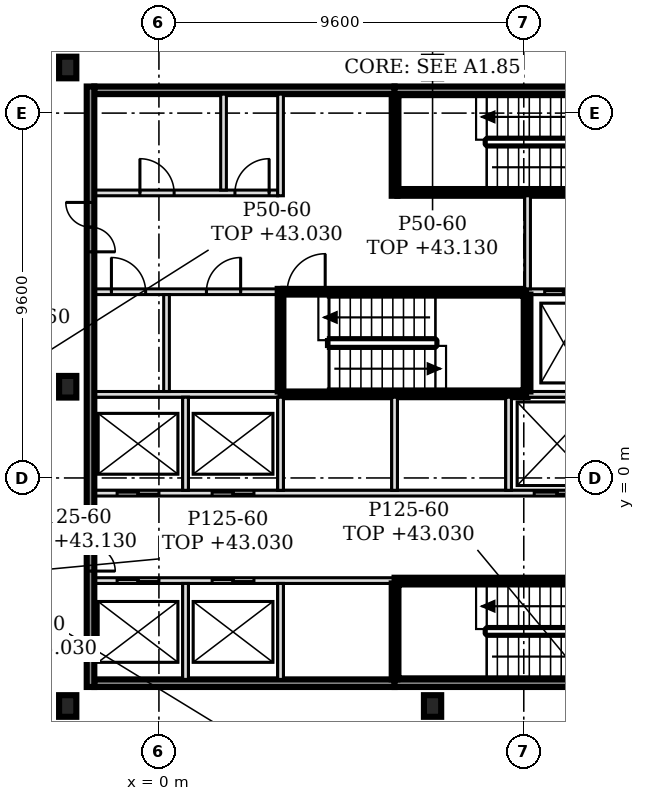
"""IFC4 building model, lengths in metres.
Left out: names, types, materials, properties, quantities, classifications, styles, units other than length and angle.
Written with IfcOpenShell. Run it as: python <this file> out.ifc"""

import sys

from ifc_helpers import new_model, si_unit, direction, frame, frame_2d, origin, origin_2d, place, context, subcontext, project, spatial, rectangle, i_section, extrude, element, fill, save


model = new_model("IFC4")
c1 = context("Model", 3, precision=1e-05, world=origin(), true_north=direction((0.0, 1.0)))
c2 = subcontext(c1, "Body", "Model", "MODEL_VIEW")
j1 = project(units=[si_unit("LENGTHUNIT", "METRE"), si_unit("PLANEANGLEUNIT", "RADIAN")], contexts=[c1])
p1 = place(None, origin())
s1 = spatial("IfcSite", under=j1, at=p1, CompositionType="ELEMENT")
p2 = place(p1, origin())
s2 = spatial("IfcBuilding", under=s1, at=p2, CompositionType="ELEMENT")
p3 = place(p2, frame((0.0, 0.0, 40.2)))
s3 = spatial("IfcBuildingStorey", under=s2, at=p3, CompositionType="ELEMENT", Elevation=40.2)
for number, where, z_axis, x_axis in (
    (1, (-2.4, -6.0, -0.15), (0.0, 0.0, 1.0), (1.0, 0.0, 0.0)),
    (2, (7.2, -6.0, -0.15), (0.0, 0.0, 1.0), (1.0, 0.0, 0.0)),
    (3, (-2.4, 2.4, -0.15), (0.0, 0.0, 1.0), (1.0, 0.0, 0.0)),
    (4, (-2.4, 10.8, -0.15), (0.0, 0.0, 1.0), (1.0, 0.0, 0.0)),
    (5, (7.2, 10.8, -0.15), (0.0, 0.0, 1.0), (1.0, 0.0, 0.0)),
):
    element("IfcColumn", number, at=place(p3, frame(where, z_axis=z_axis, x_axis=x_axis)), inside=s3, PredefinedType="COLUMN", context=c2, shape_type="SweptSolid", body=[
        extrude(i_section(OverallWidth=0.454, OverallDepth=0.569, WebThickness=0.078, FlangeThickness=0.125, FilletRadius=0.015, at=origin_2d()), origin(), (0.0, 0.0, 1.0), 3.6),
    ])
p4 = place(p3, frame((-1.7, -5.4, 0.0), z_axis=(0.0, 0.0, 1.0), x_axis=(1.0, 0.0, 0.0)))
e6 = element("IfcWall", 6, at=p4, inside=s3, PredefinedType="SOLIDWALL", context=c2, shape_type="SweptSolid", body=[
    extrude(rectangle(XDim=7.9, YDim=0.2, at=frame_2d((3.95, 0.0))), origin(), (0.0, 0.0, 1.0), 3.45),
])
p5 = place(p3, frame((6.2, -5.4, 0.0), z_axis=(0.0, 0.0, 1.0), x_axis=(1.0, 0.0, 0.0)))
e7 = element("IfcWall", 7, at=p5, inside=s3, PredefinedType="SOLIDWALL", context=c2, shape_type="SweptSolid", body=[
    extrude(rectangle(XDim=6.5, YDim=0.2, at=frame_2d((3.25, 0.0))), origin(), (0.0, 0.0, 1.0), 3.45),
])
p6 = place(p3, frame((-1.7, -2.7, 0.0), z_axis=(0.0, 0.0, 1.0), x_axis=(1.0, 0.0, 0.0)))
e8 = element("IfcWall", 8, at=p6, inside=s3, PredefinedType="SOLIDWALL", context=c2, shape_type="SweptSolid", body=[
    extrude(rectangle(XDim=7.9, YDim=0.15, at=frame_2d((3.95, 0.0))), origin(), (0.0, 0.0, 1.0), 3.45),
])
p7 = place(p6, frame((0.6, 0.0, 0.0)))
e9 = element("IfcOpeningElement", 9, at=p7, cuts=e8, PredefinedType="OPENING", context=c2, shape_type="SweptSolid", body=[
    extrude(rectangle(XDim=1.1, YDim=2.1, at=frame_2d((0.55, 1.05))), frame((0.0, 0.085, 0.0), z_axis=(0.0, -1.0, 0.0), x_axis=(1.0, 0.0, 0.0)), (0.0, 0.0, 1.0), 0.17),
])
p8 = place(p6, frame((3.1, 0.0, 0.0)))
e10 = element("IfcOpeningElement", 10, at=p8, cuts=e8, PredefinedType="OPENING", context=c2, shape_type="SweptSolid", body=[
    extrude(rectangle(XDim=1.1, YDim=2.1, at=frame_2d((0.55, 1.05))), frame((0.0, 0.085, 0.0), z_axis=(0.0, -1.0, 0.0), x_axis=(1.0, 0.0, 0.0)), (0.0, 0.0, 1.0), 0.17),
])
p9 = place(p3, frame((6.2, -2.7, 0.0), z_axis=(0.0, 0.0, 1.0), x_axis=(1.0, 0.0, 0.0)))
e11 = element("IfcWall", 11, at=p9, inside=s3, PredefinedType="SOLIDWALL", context=c2, shape_type="SweptSolid", body=[
    extrude(rectangle(XDim=6.425, YDim=0.15, at=frame_2d((3.212, 0.0))), origin(), (0.0, 0.0, 1.0), 3.45),
])
p10 = place(p9, frame((5.3, 0.0, 0.0)))
e12 = element("IfcOpeningElement", 12, at=p10, cuts=e11, PredefinedType="OPENING", context=c2, shape_type="SweptSolid", body=[
    extrude(rectangle(XDim=1.0, YDim=2.1, at=frame_2d((0.5, 1.05))), frame((0.0, 0.085, 0.0), z_axis=(0.0, -1.0, 0.0), x_axis=(1.0, 0.0, 0.0)), (0.0, 0.0, 1.0), 0.17),
])
p11 = place(p3, frame((-1.7, -0.4, 0.0), z_axis=(0.0, 0.0, 1.0), x_axis=(1.0, 0.0, 0.0)))
e13 = element("IfcWall", 13, at=p11, inside=s3, PredefinedType="SOLIDWALL", context=c2, shape_type="SweptSolid", body=[
    extrude(rectangle(XDim=15.925, YDim=0.15, at=frame_2d((7.962, 0.0))), origin(), (0.0, 0.0, 1.0), 3.45),
])
p12 = place(p11, frame((0.6, 0.0, 0.0)))
e14 = element("IfcOpeningElement", 14, at=p12, cuts=e13, PredefinedType="OPENING", context=c2, shape_type="SweptSolid", body=[
    extrude(rectangle(XDim=1.1, YDim=2.1, at=frame_2d((0.55, 1.05))), frame((0.0, 0.085, 0.0), z_axis=(0.0, -1.0, 0.0), x_axis=(1.0, 0.0, 0.0)), (0.0, 0.0, 1.0), 0.17),
])
p13 = place(p11, frame((3.1, 0.0, 0.0)))
e15 = element("IfcOpeningElement", 15, at=p13, cuts=e13, PredefinedType="OPENING", context=c2, shape_type="SweptSolid", body=[
    extrude(rectangle(XDim=1.1, YDim=2.1, at=frame_2d((0.55, 1.05))), frame((0.0, 0.085, 0.0), z_axis=(0.0, -1.0, 0.0), x_axis=(1.0, 0.0, 0.0)), (0.0, 0.0, 1.0), 0.17),
])
p14 = place(p11, frame((11.575, 0.0, 0.0)))
e16 = element("IfcOpeningElement", 16, at=p14, cuts=e13, PredefinedType="OPENING", context=c2, shape_type="SweptSolid", body=[
    extrude(rectangle(XDim=1.2, YDim=2.1, at=frame_2d((0.6, 1.05))), frame((0.0, 0.085, 0.0), z_axis=(0.0, -1.0, 0.0), x_axis=(1.0, 0.0, 0.0)), (0.0, 0.0, 1.0), 0.17),
])
p15 = place(p11, frame((14.125, 0.0, 0.0)))
e17 = element("IfcOpeningElement", 17, at=p15, cuts=e13, PredefinedType="OPENING", context=c2, shape_type="SweptSolid", body=[
    extrude(rectangle(XDim=1.2, YDim=2.1, at=frame_2d((0.6, 1.05))), frame((0.0, 0.085, 0.0), z_axis=(0.0, -1.0, 0.0), x_axis=(1.0, 0.0, 0.0)), (0.0, 0.0, 1.0), 0.17),
])
p16 = place(p3, frame((-1.7, 2.2, 0.0), z_axis=(0.0, 0.0, 1.0), x_axis=(1.0, 0.0, 0.0)))
e18 = element("IfcWall", 18, at=p16, inside=s3, PredefinedType="SOLIDWALL", context=c2, shape_type="SweptSolid", body=[
    extrude(rectangle(XDim=4.9, YDim=0.15, at=frame_2d((2.45, 0.0))), origin(), (0.0, 0.0, 1.0), 3.45),
])
p17 = place(p3, frame((3.2, 2.2, 0.0), z_axis=(0.0, 0.0, 1.0), x_axis=(1.0, 0.0, 0.0)))
e19 = element("IfcWall", 19, at=p17, inside=s3, PredefinedType="SOLIDWALL", context=c2, shape_type="SweptSolid", body=[
    extrude(rectangle(XDim=6.5, YDim=0.15, at=frame_2d((3.25, 0.0))), origin(), (0.0, 0.0, 1.0), 3.45),
])
p18 = place(p3, frame((9.7, 2.2, 0.0), z_axis=(0.0, 0.0, 1.0), x_axis=(1.0, 0.0, 0.0)))
e20 = element("IfcWall", 20, at=p18, inside=s3, PredefinedType="SOLIDWALL", context=c2, shape_type="SweptSolid", body=[
    extrude(rectangle(XDim=4.525, YDim=0.15, at=frame_2d((2.263, 0.0))), origin(), (0.0, 0.0, 1.0), 3.45),
])
p19 = place(p3, frame((-1.7, 4.9, 0.0), z_axis=(0.0, 0.0, 1.0), x_axis=(1.0, 0.0, 0.0)))
e21 = element("IfcWall", 21, at=p19, inside=s3, PredefinedType="PARTITIONING", context=c2, shape_type="SweptSolid", body=[
    extrude(rectangle(XDim=4.825, YDim=0.15, at=frame_2d((2.413, 0.0))), origin(), (0.0, 0.0, 1.0), 3.45),
])
p20 = place(p19, frame((0.45, 0.0, 0.0)))
e22 = element("IfcOpeningElement", 22, at=p20, cuts=e21, PredefinedType="OPENING", context=c2, shape_type="SweptSolid", body=[
    extrude(rectangle(XDim=0.9, YDim=2.1, at=frame_2d((0.45, 1.05))), frame((0.0, 0.085, 0.0), z_axis=(0.0, -1.0, 0.0), x_axis=(1.0, 0.0, 0.0)), (0.0, 0.0, 1.0), 0.17),
])
p21 = place(p19, frame((2.95, 0.0, 0.0)))
e23 = element("IfcOpeningElement", 23, at=p21, cuts=e21, PredefinedType="OPENING", context=c2, shape_type="SweptSolid", body=[
    extrude(rectangle(XDim=0.9, YDim=2.1, at=frame_2d((0.45, 1.05))), frame((0.0, 0.085, 0.0), z_axis=(0.0, -1.0, 0.0), x_axis=(1.0, 0.0, 0.0)), (0.0, 0.0, 1.0), 0.17),
])
p22 = place(p3, frame((3.275, 4.9, 0.0), z_axis=(0.0, 0.0, 1.0), x_axis=(1.0, 0.0, 0.0)))
e24 = element("IfcWall", 24, at=p22, inside=s3, PredefinedType="SOLIDWALL", context=c2, shape_type="SweptSolid", body=[
    extrude(rectangle(XDim=6.425, YDim=0.15, at=frame_2d((3.212, 0.0))), origin(), (0.0, 0.0, 1.0), 3.45),
])
p23 = place(p22, frame((0.1, 0.0, 0.0)))
e25 = element("IfcOpeningElement", 25, at=p23, cuts=e24, PredefinedType="OPENING", context=c2, shape_type="SweptSolid", body=[
    extrude(rectangle(XDim=1.0, YDim=2.1, at=frame_2d((0.5, 1.05))), frame((0.0, 0.085, 0.0), z_axis=(0.0, -1.0, 0.0), x_axis=(1.0, 0.0, 0.0)), (0.0, 0.0, 1.0), 0.17),
])
p24 = place(p3, frame((9.7, 4.9, 0.0), z_axis=(0.0, 0.0, 1.0), x_axis=(1.0, 0.0, 0.0)))
e26 = element("IfcWall", 26, at=p24, inside=s3, PredefinedType="SOLIDWALL", context=c2, shape_type="SweptSolid", body=[
    extrude(rectangle(XDim=6.4, YDim=0.15, at=frame_2d((3.2, 0.0))), origin(), (0.0, 0.0, 1.0), 3.45),
])
p25 = place(p24, frame((0.45, 0.0, 0.0)))
e27 = element("IfcOpeningElement", 27, at=p25, cuts=e26, PredefinedType="OPENING", context=c2, shape_type="SweptSolid", body=[
    extrude(rectangle(XDim=1.0, YDim=2.1, at=frame_2d((0.5, 1.05))), frame((0.0, 0.085, 0.0), z_axis=(0.0, -1.0, 0.0), x_axis=(1.0, 0.0, 0.0)), (0.0, 0.0, 1.0), 0.17),
])
p26 = place(p24, frame((2.35, 0.0, 0.0)))
e28 = element("IfcOpeningElement", 28, at=p26, cuts=e26, PredefinedType="OPENING", context=c2, shape_type="SweptSolid", body=[
    extrude(rectangle(XDim=1.0, YDim=2.1, at=frame_2d((0.5, 1.05))), frame((0.0, 0.085, 0.0), z_axis=(0.0, -1.0, 0.0), x_axis=(1.0, 0.0, 0.0)), (0.0, 0.0, 1.0), 0.17),
])
p27 = place(p24, frame((4.7, 0.0, 0.0)))
e29 = element("IfcOpeningElement", 29, at=p27, cuts=e26, PredefinedType="OPENING", context=c2, shape_type="SweptSolid", body=[
    extrude(rectangle(XDim=0.9, YDim=2.1, at=frame_2d((0.45, 1.05))), frame((0.0, 0.085, 0.0), z_axis=(0.0, -1.0, 0.0), x_axis=(1.0, 0.0, 0.0)), (0.0, 0.0, 1.0), 0.17),
])
p28 = place(p3, frame((-1.7, 7.5, 0.0), z_axis=(0.0, 0.0, 1.0), x_axis=(1.0, 0.0, 0.0)))
e30 = element("IfcWall", 30, at=p28, inside=s3, PredefinedType="PARTITIONING", context=c2, shape_type="SweptSolid", body=[
    extrude(rectangle(XDim=4.825, YDim=0.15, at=frame_2d((2.413, 0.0))), origin(), (0.0, 0.0, 1.0), 3.45),
])
p29 = place(p28, frame((1.2, 0.0, 0.0)))
e31 = element("IfcOpeningElement", 31, at=p29, cuts=e30, PredefinedType="OPENING", context=c2, shape_type="SweptSolid", body=[
    extrude(rectangle(XDim=0.9, YDim=2.1, at=frame_2d((0.45, 1.05))), frame((0.0, 0.085, 0.0), z_axis=(0.0, -1.0, 0.0), x_axis=(1.0, 0.0, 0.0)), (0.0, 0.0, 1.0), 0.17),
])
p30 = place(p28, frame((3.7, 0.0, 0.0)))
e32 = element("IfcOpeningElement", 32, at=p30, cuts=e30, PredefinedType="OPENING", context=c2, shape_type="SweptSolid", body=[
    extrude(rectangle(XDim=0.9, YDim=2.1, at=frame_2d((0.45, 1.05))), frame((0.0, 0.085, 0.0), z_axis=(0.0, -1.0, 0.0), x_axis=(1.0, 0.0, 0.0)), (0.0, 0.0, 1.0), 0.17),
])
p31 = place(p3, frame((6.275, 7.5, 0.0), z_axis=(0.0, 0.0, 1.0), x_axis=(1.0, 0.0, 0.0)))
e33 = element("IfcWall", 33, at=p31, inside=s3, PredefinedType="SOLIDWALL", context=c2, shape_type="SweptSolid", body=[
    extrude(rectangle(XDim=6.425, YDim=0.15, at=frame_2d((3.212, 0.0))), origin(), (0.0, 0.0, 1.0), 3.45),
])
p32 = place(p31, frame((5.225, 0.0, 0.0)))
e34 = element("IfcOpeningElement", 34, at=p32, cuts=e33, PredefinedType="OPENING", context=c2, shape_type="SweptSolid", body=[
    extrude(rectangle(XDim=1.0, YDim=2.1, at=frame_2d((0.5, 1.05))), frame((0.0, 0.085, 0.0), z_axis=(0.0, -1.0, 0.0), x_axis=(1.0, 0.0, 0.0)), (0.0, 0.0, 1.0), 0.17),
])
p33 = place(p3, frame((-1.7, 10.2, 0.0), z_axis=(0.0, 0.0, 1.0), x_axis=(1.0, 0.0, 0.0)))
e35 = element("IfcWall", 35, at=p33, inside=s3, PredefinedType="SOLIDWALL", context=c2, shape_type="SweptSolid", body=[
    extrude(rectangle(XDim=7.9, YDim=0.2, at=frame_2d((3.95, 0.0))), origin(), (0.0, 0.0, 1.0), 3.45),
])
p34 = place(p3, frame((6.2, 10.2, 0.0), z_axis=(0.0, 0.0, 1.0), x_axis=(1.0, 0.0, 0.0)))
e36 = element("IfcWall", 36, at=p34, inside=s3, PredefinedType="SOLIDWALL", context=c2, shape_type="SweptSolid", body=[
    extrude(rectangle(XDim=6.5, YDim=0.2, at=frame_2d((3.25, 0.0))), origin(), (0.0, 0.0, 1.0), 3.45),
])
p35 = place(p3, frame((-1.8, -5.5, 0.0), z_axis=(0.0, 0.0, 1.0), x_axis=(0.0, 1.0, 0.0)))
e37 = element("IfcWall", 37, at=p35, inside=s3, PredefinedType="SOLIDWALL", context=c2, shape_type="SweptSolid", body=[
    extrude(rectangle(XDim=15.8, YDim=0.2, at=frame_2d((7.9, 0.0))), origin(), (0.0, 0.0, 1.0), 3.45),
])
p36 = place(p35, frame((3.05, 0.0, 0.0)))
e38 = element("IfcOpeningElement", 38, at=p36, cuts=e37, PredefinedType="OPENING", context=c2, shape_type="SweptSolid", body=[
    extrude(rectangle(XDim=1.3, YDim=2.1, at=frame_2d((0.65, 1.05))), frame((0.0, 0.11, 0.0), z_axis=(0.0, -1.0, 0.0), x_axis=(1.0, 0.0, 0.0)), (0.0, 0.0, 1.0), 0.22),
])
p37 = place(p35, frame((11.45, 0.0, 0.0)))
e39 = element("IfcOpeningElement", 39, at=p37, cuts=e37, PredefinedType="OPENING", context=c2, shape_type="SweptSolid", body=[
    extrude(rectangle(XDim=1.3, YDim=2.1, at=frame_2d((0.65, 1.05))), frame((0.0, 0.11, 0.0), z_axis=(0.0, -1.0, 0.0), x_axis=(1.0, 0.0, 0.0)), (0.0, 0.0, 1.0), 0.22),
])
p38 = place(p3, frame((0.2, 2.275, 0.0), z_axis=(0.0, 0.0, 1.0), x_axis=(0.0, 1.0, 0.0)))
e40 = element("IfcWall", 40, at=p38, inside=s3, PredefinedType="PARTITIONING", context=c2, shape_type="SweptSolid", body=[
    extrude(rectangle(XDim=2.55, YDim=0.15, at=frame_2d((1.275, 0.0))), origin(), (0.0, 0.0, 1.0), 3.45),
])
p39 = place(p3, frame((0.7, -5.3, 0.0), z_axis=(0.0, 0.0, 1.0), x_axis=(0.0, 1.0, 0.0)))
e41 = element("IfcWall", 41, at=p39, inside=s3, PredefinedType="SOLIDWALL", context=c2, shape_type="SweptSolid", body=[
    extrude(rectangle(XDim=2.525, YDim=0.15, at=frame_2d((1.263, 0.0))), origin(), (0.0, 0.0, 1.0), 3.45),
])
p40 = place(p3, frame((0.7, -0.325, 0.0), z_axis=(0.0, 0.0, 1.0), x_axis=(0.0, 1.0, 0.0)))
e42 = element("IfcWall", 42, at=p40, inside=s3, PredefinedType="SOLIDWALL", context=c2, shape_type="SweptSolid", body=[
    extrude(rectangle(XDim=2.45, YDim=0.15, at=frame_2d((1.225, 0.0))), origin(), (0.0, 0.0, 1.0), 3.45),
])
p41 = place(p3, frame((1.7, 7.575, 0.0), z_axis=(0.0, 0.0, 1.0), x_axis=(0.0, 1.0, 0.0)))
e43 = element("IfcWall", 43, at=p41, inside=s3, PredefinedType="PARTITIONING", context=c2, shape_type="SweptSolid", body=[
    extrude(rectangle(XDim=2.525, YDim=0.15, at=frame_2d((1.263, 0.0))), origin(), (0.0, 0.0, 1.0), 3.45),
])
p42 = place(p3, frame((3.2, -5.3, 0.0), z_axis=(0.0, 0.0, 1.0), x_axis=(0.0, 1.0, 0.0)))
e44 = element("IfcWall", 44, at=p42, inside=s3, PredefinedType="SOLIDWALL", context=c2, shape_type="SweptSolid", body=[
    extrude(rectangle(XDim=2.525, YDim=0.15, at=frame_2d((1.263, 0.0))), origin(), (0.0, 0.0, 1.0), 3.45),
])
p43 = place(p3, frame((3.2, -0.325, 0.0), z_axis=(0.0, 0.0, 1.0), x_axis=(0.0, 1.0, 0.0)))
e45 = element("IfcWall", 45, at=p43, inside=s3, PredefinedType="SOLIDWALL", context=c2, shape_type="SweptSolid", body=[
    extrude(rectangle(XDim=2.45, YDim=0.15, at=frame_2d((1.225, 0.0))), origin(), (0.0, 0.0, 1.0), 3.45),
])
p44 = place(p3, frame((3.2, 2.275, 0.0), z_axis=(0.0, 0.0, 1.0), x_axis=(0.0, 1.0, 0.0)))
e46 = element("IfcWall", 46, at=p44, inside=s3, PredefinedType="SOLIDWALL", context=c2, shape_type="SweptSolid", body=[
    extrude(rectangle(XDim=2.7, YDim=0.15, at=frame_2d((1.35, 0.0))), origin(), (0.0, 0.0, 1.0), 3.45),
])
p45 = place(p3, frame((3.2, 7.425, 0.0), z_axis=(0.0, 0.0, 1.0), x_axis=(0.0, 1.0, 0.0)))
e47 = element("IfcWall", 47, at=p45, inside=s3, PredefinedType="PARTITIONING", context=c2, shape_type="SweptSolid", body=[
    extrude(rectangle(XDim=2.675, YDim=0.15, at=frame_2d((1.337, 0.0))), origin(), (0.0, 0.0, 1.0), 3.45),
])
p46 = place(p3, frame((6.2, -5.3, 0.0), z_axis=(0.0, 0.0, 1.0), x_axis=(0.0, 1.0, 0.0)))
e48 = element("IfcWall", 48, at=p46, inside=s3, PredefinedType="SOLIDWALL", context=c2, shape_type="SweptSolid", body=[
    extrude(rectangle(XDim=2.525, YDim=0.15, at=frame_2d((1.263, 0.0))), origin(), (0.0, 0.0, 1.0), 3.45),
])
p47 = place(p3, frame((6.2, -0.325, 0.0), z_axis=(0.0, 0.0, 1.0), x_axis=(0.0, 1.0, 0.0)))
e49 = element("IfcWall", 49, at=p47, inside=s3, PredefinedType="SOLIDWALL", context=c2, shape_type="SweptSolid", body=[
    extrude(rectangle(XDim=2.45, YDim=0.15, at=frame_2d((1.225, 0.0))), origin(), (0.0, 0.0, 1.0), 3.45),
])
p48 = place(p3, frame((6.2, 7.425, 0.0), z_axis=(0.0, 0.0, 1.0), x_axis=(0.0, 1.0, 0.0)))
e50 = element("IfcWall", 50, at=p48, inside=s3, PredefinedType="SOLIDWALL", context=c2, shape_type="SweptSolid", body=[
    extrude(rectangle(XDim=2.675, YDim=0.15, at=frame_2d((1.337, 0.0))), origin(), (0.0, 0.0, 1.0), 3.45),
])
p49 = place(p3, frame((9.2, -0.325, 0.0), z_axis=(0.0, 0.0, 1.0), x_axis=(0.0, 1.0, 0.0)))
e51 = element("IfcWall", 51, at=p49, inside=s3, PredefinedType="SOLIDWALL", context=c2, shape_type="SweptSolid", body=[
    extrude(rectangle(XDim=2.45, YDim=0.15, at=frame_2d((1.225, 0.0))), origin(), (0.0, 0.0, 1.0), 3.45),
])
p50 = place(p3, frame((9.7, 2.275, 0.0), z_axis=(0.0, 0.0, 1.0), x_axis=(0.0, 1.0, 0.0)))
e52 = element("IfcWall", 52, at=p50, inside=s3, PredefinedType="SOLIDWALL", context=c2, shape_type="SweptSolid", body=[
    extrude(rectangle(XDim=2.55, YDim=0.15, at=frame_2d((1.275, 0.0))), origin(), (0.0, 0.0, 1.0), 3.45),
])
p51 = place(p3, frame((9.7, 4.975, 0.0), z_axis=(0.0, 0.0, 1.0), x_axis=(0.0, 1.0, 0.0)))
e53 = element("IfcWall", 53, at=p51, inside=s3, PredefinedType="SOLIDWALL", context=c2, shape_type="SweptSolid", body=[
    extrude(rectangle(XDim=2.45, YDim=0.15, at=frame_2d((1.225, 0.0))), origin(), (0.0, 0.0, 1.0), 3.45),
])
p52 = place(p7, origin())
e54 = element("IfcDoor", 54, at=p52, inside=s3, OperationType="DOUBLE_DOOR_SLIDING", PredefinedType="DOOR", context=c2, shape_type="SweptSolid", body=[
    extrude(rectangle(XDim=1.1, YDim=2.1, at=frame_2d((0.55, 1.05))), frame((0.0, 0.025, 0.0), z_axis=(0.0, -1.0, 0.0), x_axis=(1.0, 0.0, 0.0)), (0.0, 0.0, 1.0), 0.05),
])
fill(e9, e54)
p53 = place(p8, origin())
e55 = element("IfcDoor", 55, at=p53, inside=s3, OperationType="DOUBLE_DOOR_SLIDING", PredefinedType="DOOR", context=c2, shape_type="SweptSolid", body=[
    extrude(rectangle(XDim=1.1, YDim=2.1, at=frame_2d((0.55, 1.05))), frame((0.0, 0.025, 0.0), z_axis=(0.0, -1.0, 0.0), x_axis=(1.0, 0.0, 0.0)), (0.0, 0.0, 1.0), 0.05),
])
fill(e10, e55)
p54 = place(p12, origin())
e56 = element("IfcDoor", 56, at=p54, inside=s3, OperationType="DOUBLE_DOOR_SLIDING", PredefinedType="DOOR", context=c2, shape_type="SweptSolid", body=[
    extrude(rectangle(XDim=1.1, YDim=2.1, at=frame_2d((0.55, 1.05))), frame((0.0, 0.025, 0.0), z_axis=(0.0, -1.0, 0.0), x_axis=(1.0, 0.0, 0.0)), (0.0, 0.0, 1.0), 0.05),
])
fill(e14, e56)
p55 = place(p13, origin())
e57 = element("IfcDoor", 57, at=p55, inside=s3, OperationType="DOUBLE_DOOR_SLIDING", PredefinedType="DOOR", context=c2, shape_type="SweptSolid", body=[
    extrude(rectangle(XDim=1.1, YDim=2.1, at=frame_2d((0.55, 1.05))), frame((0.0, 0.025, 0.0), z_axis=(0.0, -1.0, 0.0), x_axis=(1.0, 0.0, 0.0)), (0.0, 0.0, 1.0), 0.05),
])
fill(e15, e57)
p56 = place(p14, origin())
e58 = element("IfcDoor", 58, at=p56, inside=s3, OperationType="DOUBLE_DOOR_SLIDING", PredefinedType="DOOR", context=c2, shape_type="SweptSolid", body=[
    extrude(rectangle(XDim=1.2, YDim=2.1, at=frame_2d((0.6, 1.05))), frame((0.0, 0.025, 0.0), z_axis=(0.0, -1.0, 0.0), x_axis=(1.0, 0.0, 0.0)), (0.0, 0.0, 1.0), 0.05),
])
fill(e16, e58)
p57 = place(p25, origin())
e59 = element("IfcDoor", 59, at=p57, inside=s3, OperationType="DOUBLE_DOOR_SLIDING", PredefinedType="DOOR", context=c2, shape_type="SweptSolid", body=[
    extrude(rectangle(XDim=1.0, YDim=2.1, at=frame_2d((0.5, 1.05))), frame((0.0, 0.025, 0.0), z_axis=(0.0, -1.0, 0.0), x_axis=(1.0, 0.0, 0.0)), (0.0, 0.0, 1.0), 0.05),
])
fill(e27, e59)
p58 = place(p23, origin())
e60 = element("IfcDoor", 60, at=p58, inside=s3, OperationType="SINGLE_SWING_RIGHT", PredefinedType="DOOR", context=c2, shape_type="SweptSolid", body=[
    extrude(rectangle(XDim=1.0, YDim=2.1, at=frame_2d((0.5, 1.05))), frame((0.0, 0.025, 0.0), z_axis=(0.0, -1.0, 0.0), x_axis=(1.0, 0.0, 0.0)), (0.0, 0.0, 1.0), 0.05),
])
fill(e25, e60)
p59 = place(p36, origin())
e61 = element("IfcDoor", 61, at=p59, inside=s3, OperationType="DOUBLE_DOOR_SINGLE_SWING", PredefinedType="DOOR", context=c2, shape_type="SweptSolid", body=[
    extrude(rectangle(XDim=1.3, YDim=2.1, at=frame_2d((0.65, 1.05))), frame((0.0, 0.025, 0.0), z_axis=(0.0, -1.0, 0.0), x_axis=(1.0, 0.0, 0.0)), (0.0, 0.0, 1.0), 0.05),
])
fill(e38, e61)
p60 = place(p37, origin())
e62 = element("IfcDoor", 62, at=p60, inside=s3, OperationType="DOUBLE_DOOR_SINGLE_SWING", PredefinedType="DOOR", context=c2, shape_type="SweptSolid", body=[
    extrude(rectangle(XDim=1.3, YDim=2.1, at=frame_2d((0.65, 1.05))), frame((0.0, 0.025, 0.0), z_axis=(0.0, -1.0, 0.0), x_axis=(1.0, 0.0, 0.0)), (0.0, 0.0, 1.0), 0.05),
])
fill(e39, e62)
p61 = place(p20, origin())
e63 = element("IfcDoor", 63, at=p61, inside=s3, OperationType="SINGLE_SWING_LEFT", PredefinedType="DOOR", context=c2, shape_type="SweptSolid", body=[
    extrude(rectangle(XDim=0.9, YDim=2.1, at=frame_2d((0.45, 1.05))), frame((0.0, 0.025, 0.0), z_axis=(0.0, -1.0, 0.0), x_axis=(1.0, 0.0, 0.0)), (0.0, 0.0, 1.0), 0.05),
])
fill(e22, e63)
p62 = place(p21, origin())
e64 = element("IfcDoor", 64, at=p62, inside=s3, OperationType="SINGLE_SWING_RIGHT", PredefinedType="DOOR", context=c2, shape_type="SweptSolid", body=[
    extrude(rectangle(XDim=0.9, YDim=2.1, at=frame_2d((0.45, 1.05))), frame((0.0, 0.025, 0.0), z_axis=(0.0, -1.0, 0.0), x_axis=(1.0, 0.0, 0.0)), (0.0, 0.0, 1.0), 0.05),
])
fill(e23, e64)
p63 = place(p29, origin())
e65 = element("IfcDoor", 65, at=p63, inside=s3, OperationType="SINGLE_SWING_LEFT", PredefinedType="DOOR", context=c2, shape_type="SweptSolid", body=[
    extrude(rectangle(XDim=0.9, YDim=2.1, at=frame_2d((0.45, 1.05))), frame((0.0, 0.025, 0.0), z_axis=(0.0, -1.0, 0.0), x_axis=(1.0, 0.0, 0.0)), (0.0, 0.0, 1.0), 0.05),
])
fill(e31, e65)
p64 = place(p30, origin())
e66 = element("IfcDoor", 66, at=p64, inside=s3, OperationType="SINGLE_SWING_RIGHT", PredefinedType="DOOR", context=c2, shape_type="SweptSolid", body=[
    extrude(rectangle(XDim=0.9, YDim=2.1, at=frame_2d((0.45, 1.05))), frame((0.0, 0.025, 0.0), z_axis=(0.0, -1.0, 0.0), x_axis=(1.0, 0.0, 0.0)), (0.0, 0.0, 1.0), 0.05),
])
fill(e32, e66)
save(model, sys.argv[1])
